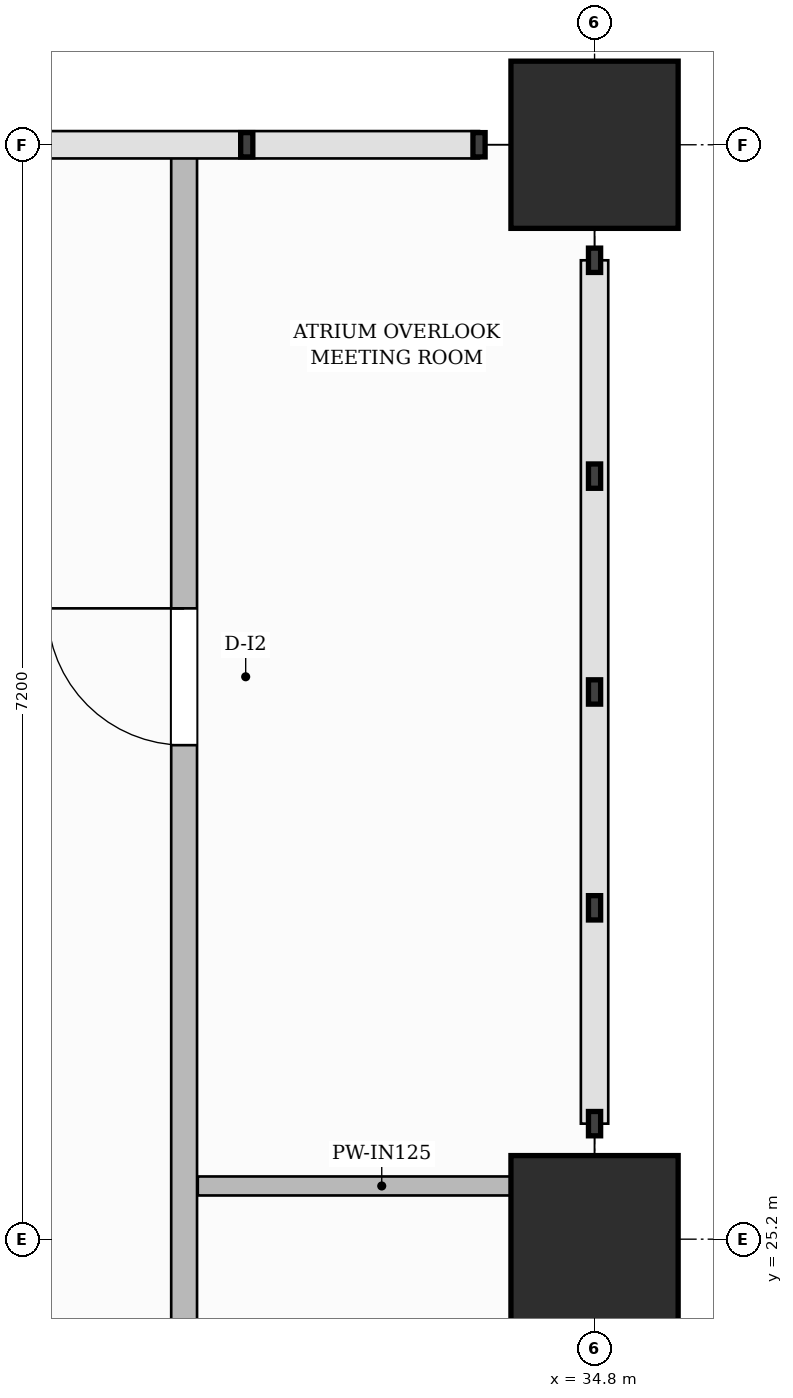
"""IFC4 building model, lengths in metres.
Left out: names, types, materials, properties, quantities, classifications, styles, units other than length and angle.
Written with IfcOpenShell. Run it as: python <this file> out.ifc"""

import sys

from ifc_helpers import new_model, si_unit, direction, frame, frame_2d, origin, origin_2d, place, context, subcontext, project, spatial, rectangle, extrude, source, transform, mapped, element, fill, save


model = new_model("IFC4")
c1 = context("Model", 3, precision=1e-05, world=origin(), true_north=direction((0.0, 1.0)))
c2 = subcontext(c1, "Body", "Model", "MODEL_VIEW")
j1 = project(units=[si_unit("LENGTHUNIT", "METRE"), si_unit("PLANEANGLEUNIT", "RADIAN")], contexts=[c1])
p1 = place(None, origin())
s1 = spatial("IfcSite", under=j1, at=p1, CompositionType="ELEMENT")
p2 = place(p1, origin())
s2 = spatial("IfcBuilding", under=s1, at=p2, CompositionType="ELEMENT")
p3 = place(p2, frame((0.0, 0.0, 76.8)))
s3 = spatial("IfcBuildingStorey", under=s2, at=p3, CompositionType="ELEMENT", Elevation=76.8)
m1 = source(origin(), c2, "Body", "SweptSolid", [
    extrude(rectangle(XDim=1.1, YDim=1.1, at=origin_2d()), origin(), (0.0, 0.0, 1.0), 3.7),
])
for number, where, z_axis, x_axis in (
    (1, (34.8, 25.2, 0.0), (0.0, 0.0, 1.0), (1.0, 0.0, 0.0)),
    (2, (34.8, 32.4, 0.0), (0.0, 0.0, 1.0), (1.0, 0.0, 0.0)),
):
    element("IfcColumn", number, at=place(p3, frame(where, z_axis=z_axis, x_axis=x_axis)), inside=s3, PredefinedType="COLUMN", context=c2, shape_type="MappedRepresentation", body=[
        mapped(m1, transform((0.0, 0.0, 0.0), scale=1.0)),
    ])
p4 = place(p3, frame((32.1, 21.67, 0.0), z_axis=(0.0, 0.0, 1.0), x_axis=(0.0, 1.0, 0.0)))
e3 = element("IfcWall", 3, at=p4, inside=s3, PredefinedType="PARTITIONING", context=c2, shape_type="SweptSolid", body=[
    extrude(rectangle(XDim=10.702, YDim=0.17, at=frame_2d((5.351, 0.0))), origin(), (0.0, 0.0, 1.0), 3.45),
])
p5 = place(p4, frame((1.53, 0.0, 0.0)))
e4 = element("IfcOpeningElement", 4, at=p5, cuts=e3, PredefinedType="OPENING", context=c2, shape_type="SweptSolid", body=[
    extrude(rectangle(XDim=0.9, YDim=2.15, at=frame_2d((0.45, 1.075))), frame((0.0, 0.095, 0.0), z_axis=(0.0, -1.0, 0.0), x_axis=(1.0, 0.0, 0.0)), (0.0, 0.0, 1.0), 0.19),
])
p6 = place(p4, frame((6.78, 0.0, 0.0)))
e5 = element("IfcOpeningElement", 5, at=p6, cuts=e3, PredefinedType="OPENING", context=c2, shape_type="SweptSolid", body=[
    extrude(rectangle(XDim=0.9, YDim=2.15, at=frame_2d((0.45, 1.075))), frame((0.0, 0.095, 0.0), z_axis=(0.0, -1.0, 0.0), x_axis=(1.0, 0.0, 0.0)), (0.0, 0.0, 1.0), 0.19),
])
p7 = place(p3, frame((32.19, 25.55, 0.0), z_axis=(0.0, 0.0, 1.0), x_axis=(1.0, 0.0, 0.0)))
e6 = element("IfcWall", 6, at=p7, inside=s3, PredefinedType="PARTITIONING", context=c2, shape_type="SweptSolid", body=[
    extrude(rectangle(XDim=2.42, YDim=0.125, at=frame_2d((1.21, 0.0))), origin(), (0.0, 0.0, 1.0), 3.45),
])
m2 = source(origin(), c2, "Body", "SweptSolid", [
    extrude(rectangle(XDim=0.9, YDim=2.15, at=frame_2d((0.45, 1.075))), frame((0.0, 0.025, 0.0), z_axis=(0.0, -1.0, 0.0), x_axis=(1.0, 0.0, 0.0)), (0.0, 0.0, 1.0), 0.05),
])
p8 = place(p6, origin())
e7 = element("IfcDoor", 7, at=p8, inside=s3, OperationType="SINGLE_SWING_RIGHT", PredefinedType="DOOR", context=c2, shape_type="MappedRepresentation", body=[
    mapped(m2, transform((0.0, 0.0, 0.0), scale=1.0)),
])
fill(e5, e7)
save(model, sys.argv[1])
